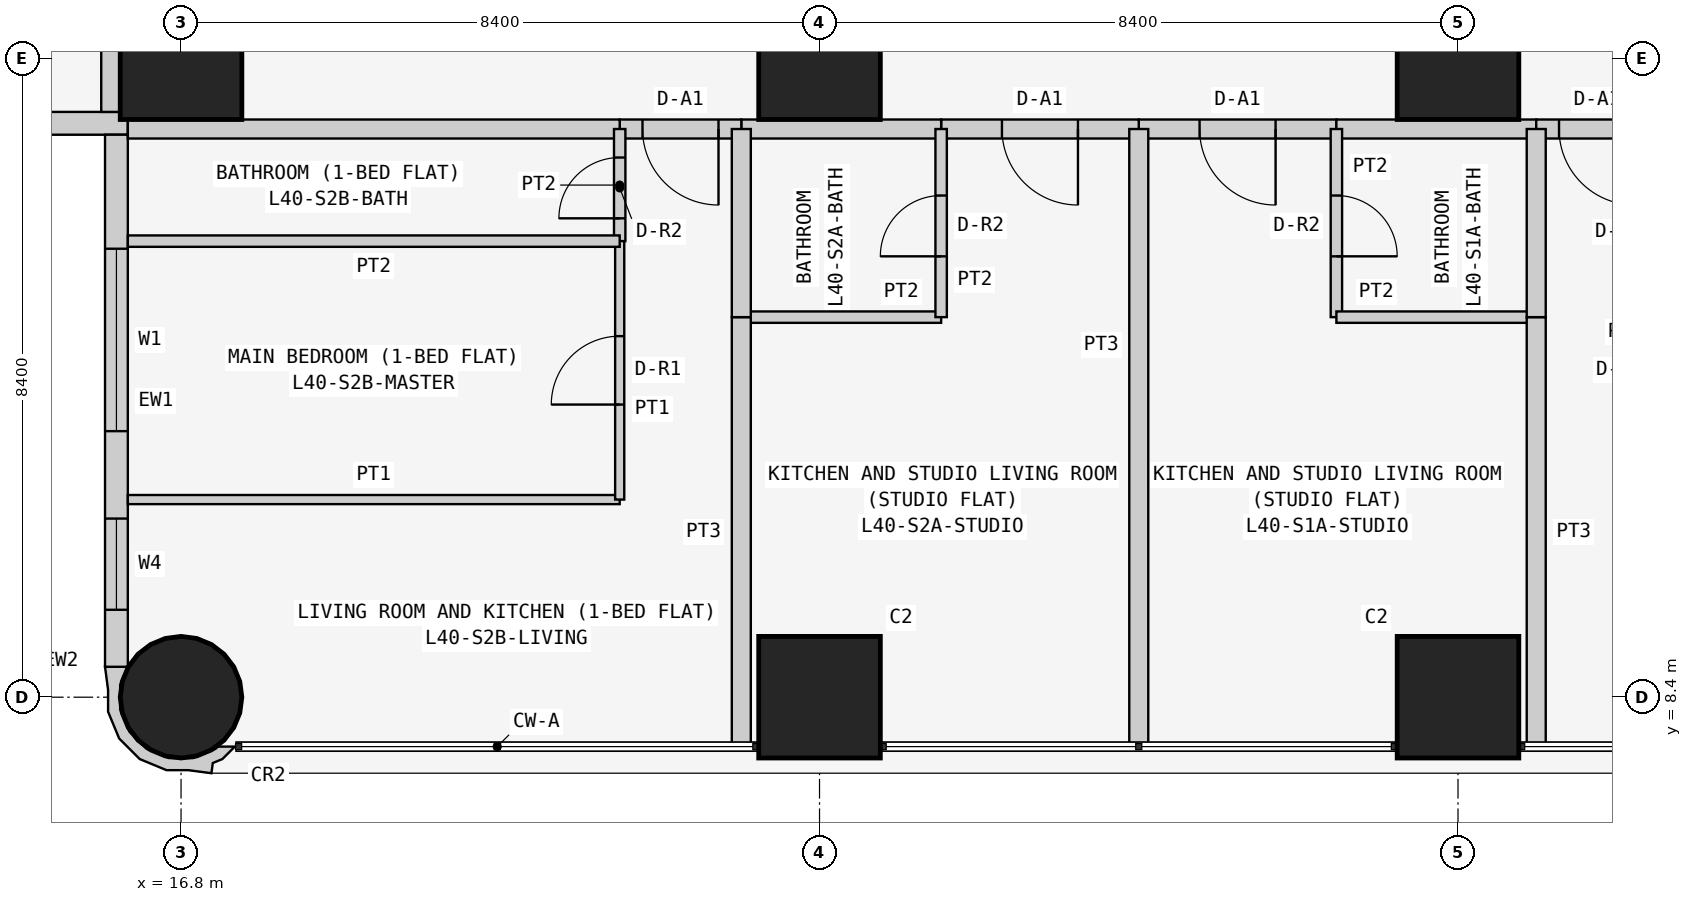
"""IFC4 building model, lengths in metres.
Left out: names, types, materials, properties, quantities, classifications, styles, units other than length and angle.
Written with IfcOpenShell. Run it as: python <this file> out.ifc"""

import sys

from ifc_helpers import new_model, si_unit, direction, frame, frame_2d, origin, origin_2d, place, context, subcontext, project, spatial, polyline, rectangle, circle, outline, extrude, element, fill, save


model = new_model("IFC4")
c1 = context("Model", 3, precision=1e-05, world=origin(), true_north=direction((0.0, 1.0)))
c2 = subcontext(c1, "Body", "Model", "MODEL_VIEW")
j1 = project(units=[si_unit("LENGTHUNIT", "METRE"), si_unit("PLANEANGLEUNIT", "RADIAN")], contexts=[c1])
p1 = place(None, origin())
s1 = spatial("IfcSite", under=j1, at=p1, CompositionType="ELEMENT")
p2 = place(p1, origin())
s2 = spatial("IfcBuilding", under=s1, at=p2, CompositionType="ELEMENT")
p3 = place(p2, frame((0.0, 0.0, 155.7)))
s3 = spatial("IfcBuildingStorey", under=s2, at=p3, CompositionType="ELEMENT", Elevation=155.7)
p4 = place(p3, frame((16.8, 8.4, 0.0), z_axis=(0.0, 0.0, 1.0), x_axis=(1.0, 0.0, 0.0)))
e1 = element("IfcColumn", 1, at=p4, inside=s3, PredefinedType="COLUMN", context=c2, shape_type="SweptSolid", body=[
    extrude(circle(Radius=0.8, at=origin_2d()), origin(), (0.0, 0.0, 1.0), 3.6),
])
for number, where, z_axis, x_axis in (
    (2, (16.8, 16.8, 0.0), (0.0, 0.0, 1.0), (1.0, 0.0, 0.0)),
    (3, (25.2, 8.4, 0.0), (0.0, 0.0, 1.0), (1.0, 0.0, 0.0)),
    (4, (25.2, 16.8, 0.0), (0.0, 0.0, 1.0), (1.0, 0.0, 0.0)),
    (5, (33.6, 8.4, 0.0), (0.0, 0.0, 1.0), (1.0, 0.0, 0.0)),
    (6, (33.6, 16.8, 0.0), (0.0, 0.0, 1.0), (1.0, 0.0, 0.0)),
):
    element("IfcColumn", number, at=place(p3, frame(where, z_axis=z_axis, x_axis=x_axis)), inside=s3, PredefinedType="COLUMN", context=c2, shape_type="SweptSolid", body=[
        extrude(rectangle(XDim=1.6, YDim=1.6, at=origin_2d()), origin(), (0.0, 0.0, 1.0), 3.6),
    ])
p5 = place(p3, frame((0.4, 15.95, 0.0), z_axis=(0.0, 0.0, 1.0), x_axis=(1.0, 0.0, 0.0)))
e7 = element("IfcWall", 7, at=p5, inside=s3, PredefinedType="SOLIDWALL", context=c2, shape_type="SweptSolid", body=[
    extrude(rectangle(XDim=15.7, YDim=0.3, at=frame_2d((7.85, 0.0))), origin(), (0.0, 0.0, 1.0), 3.45),
])
p6 = place(p5, frame((12.4, 0.0, 0.9)))
e8 = element("IfcOpeningElement", 8, at=p6, cuts=e7, PredefinedType="OPENING", context=c2, shape_type="SweptSolid", body=[
    extrude(rectangle(XDim=1.8, YDim=1.5, at=frame_2d((0.9, 0.75))), frame((0.0, 0.16, 0.0), z_axis=(0.0, -1.0, 0.0), x_axis=(1.0, 0.0, 0.0)), (0.0, 0.0, 1.0), 0.32),
])
p7 = place(p5, frame((9.55, 0.0, 1.5)))
e9 = element("IfcOpeningElement", 9, at=p7, cuts=e7, PredefinedType="OPENING", context=c2, shape_type="SweptSolid", body=[
    extrude(rectangle(XDim=0.9, YDim=0.7, at=frame_2d((0.45, 0.35))), frame((0.0, 0.16, 0.0), z_axis=(0.0, -1.0, 0.0), x_axis=(1.0, 0.0, 0.0)), (0.0, 0.0, 1.0), 0.32),
])
p8 = place(p5, frame((5.1, 0.0, 0.9)))
e10 = element("IfcOpeningElement", 10, at=p8, cuts=e7, PredefinedType="OPENING", context=c2, shape_type="SweptSolid", body=[
    extrude(rectangle(XDim=1.8, YDim=1.5, at=frame_2d((0.9, 0.75))), frame((0.0, 0.16, 0.0), z_axis=(0.0, -1.0, 0.0), x_axis=(1.0, 0.0, 0.0)), (0.0, 0.0, 1.0), 0.32),
])
p9 = place(p5, frame((2.0, 0.0, 0.0)))
e11 = element("IfcOpeningElement", 11, at=p9, cuts=e7, PredefinedType="OPENING", context=c2, shape_type="SweptSolid", body=[
    extrude(rectangle(XDim=0.9, YDim=2.4, at=frame_2d((0.45, 1.2))), frame((0.0, 0.16, 0.0), z_axis=(0.0, -1.0, 0.0), x_axis=(1.0, 0.0, 0.0)), (0.0, 0.0, 1.0), 0.32),
])
p10 = place(p5, frame((0.7, 0.0, 0.9)))
e12 = element("IfcOpeningElement", 12, at=p10, cuts=e7, PredefinedType="OPENING", context=c2, shape_type="SweptSolid", body=[
    extrude(rectangle(XDim=1.2, YDim=1.5, at=frame_2d((0.6, 0.75))), frame((0.0, 0.16, 0.0), z_axis=(0.0, -1.0, 0.0), x_axis=(1.0, 0.0, 0.0)), (0.0, 0.0, 1.0), 0.32),
])
p11 = place(p3, frame((15.95, 15.8, 0.0), z_axis=(0.0, 0.0, 1.0), x_axis=(0.0, -1.0, 0.0)))
e13 = element("IfcWall", 13, at=p11, inside=s3, PredefinedType="SOLIDWALL", context=c2, shape_type="SweptSolid", body=[
    extrude(rectangle(XDim=7.0, YDim=0.3, at=frame_2d((3.5, 0.0))), origin(), (0.0, 0.0, 1.0), 3.45),
])
p12 = place(p11, frame((1.5, 0.0, 0.9)))
e14 = element("IfcOpeningElement", 14, at=p12, cuts=e13, PredefinedType="OPENING", context=c2, shape_type="SweptSolid", body=[
    extrude(rectangle(XDim=2.4, YDim=1.5, at=frame_2d((1.2, 0.75))), frame((0.0, 0.16, 0.0), z_axis=(0.0, -1.0, 0.0), x_axis=(1.0, 0.0, 0.0)), (0.0, 0.0, 1.0), 0.32),
])
p13 = place(p11, frame((5.05, 0.0, 0.9)))
e15 = element("IfcOpeningElement", 15, at=p13, cuts=e13, PredefinedType="OPENING", context=c2, shape_type="SweptSolid", body=[
    extrude(rectangle(XDim=1.2, YDim=1.5, at=frame_2d((0.6, 0.75))), frame((0.0, 0.16, 0.0), z_axis=(0.0, -1.0, 0.0), x_axis=(1.0, 0.0, 0.0)), (0.0, 0.0, 1.0), 0.32),
])
p14 = place(p3, frame((15.983, 8.727, 0.0), z_axis=(0.0, 0.0, 1.0), x_axis=(-0.343276641956, -0.93923434088, 0.0)))
e16 = element("IfcWall", 16, at=p14, inside=s3, PredefinedType="SOLIDWALL", context=c2, shape_type="SweptSolid", body=[
    extrude(outline(polyline([(0.829, 1.599), (0.697, 1.569), (0.604, 1.67), (0.394, 1.767), (0.471, 1.556), (0.509, 1.539), (0.724, 1.304), (0.833, 1.005), (0.82, 0.686), (0.686, 0.397), (0.451, 0.182), (0.152, 0.073), (-0.116, 0.084), (-0.127, 0.078), (-0.146, 0.071), (-0.006, -0.197), (0.266, -0.055), (0.535, 0.044), (0.817, 0.302), (0.978, 0.648), (0.994, 1.03), (0.895, 1.3), (0.829, 1.599)])), origin(), (0.0, 0.0, 1.0), 3.45),
])
p15 = place(p3, frame((32.0, 15.875, 0.0), z_axis=(0.0, 0.0, 1.0), x_axis=(-1.0, 0.0, 0.0)))
e17 = element("IfcWall", 17, at=p15, inside=s3, PredefinedType="PARTITIONING", context=c2, shape_type="SweptSolid", body=[
    extrude(rectangle(XDim=2.6, YDim=0.25, at=frame_2d((1.3, 0.0))), origin(), (0.0, 0.0, 1.0), 3.45),
])
p16 = place(p15, frame((0.8, 0.0, 0.0)))
e18 = element("IfcOpeningElement", 18, at=p16, cuts=e17, PredefinedType="OPENING", context=c2, shape_type="SweptSolid", body=[
    extrude(rectangle(XDim=1.0, YDim=2.1, at=frame_2d((0.5, 1.05))), frame((0.0, 0.135, 0.0), z_axis=(0.0, -1.0, 0.0), x_axis=(1.0, 0.0, 0.0)), (0.0, 0.0, 1.0), 0.27),
])
p17 = place(p3, frame((34.629, 15.875, 0.0), z_axis=(0.0, 0.0, 1.0), x_axis=(-1.0, 0.0, 0.0)))
e19 = element("IfcWall", 19, at=p17, inside=s3, PredefinedType="PARTITIONING", context=c2, shape_type="SweptSolid", body=[
    extrude(rectangle(XDim=2.629, YDim=0.25, at=frame_2d((1.314, 0.0))), origin(), (0.0, 0.0, 1.0), 3.45),
])
p18 = place(p3, frame((36.229, 15.875, 0.0), z_axis=(0.0, 0.0, 1.0), x_axis=(-1.0, 0.0, 0.0)))
e20 = element("IfcWall", 20, at=p18, inside=s3, PredefinedType="PARTITIONING", context=c2, shape_type="SweptSolid", body=[
    extrude(rectangle(XDim=1.6, YDim=0.25, at=frame_2d((0.8, 0.0))), origin(), (0.0, 0.0, 1.0), 3.45),
])
p19 = place(p18, frame((0.3, 0.0, 0.0)))
e21 = element("IfcOpeningElement", 21, at=p19, cuts=e20, PredefinedType="OPENING", context=c2, shape_type="SweptSolid", body=[
    extrude(rectangle(XDim=1.0, YDim=2.1, at=frame_2d((0.5, 1.05))), frame((0.0, 0.135, 0.0), z_axis=(0.0, -1.0, 0.0), x_axis=(1.0, 0.0, 0.0)), (0.0, 0.0, 1.0), 0.27),
])
p20 = place(p3, frame((29.4, 15.875, 0.0), z_axis=(0.0, 0.0, 1.0), x_axis=(-1.0, 0.0, 0.0)))
e22 = element("IfcWall", 22, at=p20, inside=s3, PredefinedType="PARTITIONING", context=c2, shape_type="SweptSolid", body=[
    extrude(rectangle(XDim=2.6, YDim=0.25, at=frame_2d((1.3, 0.0))), origin(), (0.0, 0.0, 1.0), 3.45),
])
p21 = place(p20, frame((0.8, 0.0, 0.0)))
e23 = element("IfcOpeningElement", 23, at=p21, cuts=e22, PredefinedType="OPENING", context=c2, shape_type="SweptSolid", body=[
    extrude(rectangle(XDim=1.0, YDim=2.1, at=frame_2d((0.5, 1.05))), frame((0.0, 0.135, 0.0), z_axis=(0.0, -1.0, 0.0), x_axis=(1.0, 0.0, 0.0)), (0.0, 0.0, 1.0), 0.27),
])
p22 = place(p3, frame((26.8, 15.875, 0.0), z_axis=(0.0, 0.0, 1.0), x_axis=(-1.0, 0.0, 0.0)))
e24 = element("IfcWall", 24, at=p22, inside=s3, PredefinedType="PARTITIONING", context=c2, shape_type="SweptSolid", body=[
    extrude(rectangle(XDim=2.629, YDim=0.25, at=frame_2d((1.314, 0.0))), origin(), (0.0, 0.0, 1.0), 3.45),
])
p23 = place(p3, frame((24.171, 15.875, 0.0), z_axis=(0.0, 0.0, 1.0), x_axis=(-1.0, 0.0, 0.0)))
e25 = element("IfcWall", 25, at=p23, inside=s3, PredefinedType="PARTITIONING", context=c2, shape_type="SweptSolid", body=[
    extrude(rectangle(XDim=1.6, YDim=0.25, at=frame_2d((0.8, 0.0))), origin(), (0.0, 0.0, 1.0), 3.45),
])
p24 = place(p23, frame((0.3, 0.0, 0.0)))
e26 = element("IfcOpeningElement", 26, at=p24, cuts=e25, PredefinedType="OPENING", context=c2, shape_type="SweptSolid", body=[
    extrude(rectangle(XDim=1.0, YDim=2.1, at=frame_2d((0.5, 1.05))), frame((0.0, 0.135, 0.0), z_axis=(0.0, -1.0, 0.0), x_axis=(1.0, 0.0, 0.0)), (0.0, 0.0, 1.0), 0.27),
])
p25 = place(p3, frame((22.571, 15.875, 0.0), z_axis=(0.0, 0.0, 1.0), x_axis=(-1.0, 0.0, 0.0)))
e27 = element("IfcWall", 27, at=p25, inside=s3, PredefinedType="PARTITIONING", context=c2, shape_type="SweptSolid", body=[
    extrude(rectangle(XDim=6.471, YDim=0.25, at=frame_2d((3.235, 0.0))), origin(), (0.0, 0.0, 1.0), 3.45),
])
p26 = place(p3, frame((15.875, 16.1, 0.0), z_axis=(0.0, 0.0, 1.0), x_axis=(0.0, 1.0, 0.0)))
e28 = element("IfcWall", 28, at=p26, inside=s3, PredefinedType="PARTITIONING", context=c2, shape_type="SweptSolid", body=[
    extrude(rectangle(XDim=6.871, YDim=0.25, at=frame_2d((3.436, 0.0))), origin(), (0.0, 0.0, 1.0), 3.45),
])
p27 = place(p3, frame((32.0, 15.875, 0.0), z_axis=(0.0, 0.0, 1.0), x_axis=(0.0, -1.0, 0.0)))
e29 = element("IfcWall", 29, at=p27, inside=s3, PredefinedType="PARTITIONING", context=c2, shape_type="SweptSolid", body=[
    extrude(rectangle(XDim=2.475, YDim=0.15, at=frame_2d((1.238, 0.0))), origin(), (0.0, 0.0, 1.0), 3.45),
])
p28 = place(p27, frame((0.875, 0.0, 0.0)))
e30 = element("IfcOpeningElement", 30, at=p28, cuts=e29, PredefinedType="OPENING", context=c2, shape_type="SweptSolid", body=[
    extrude(rectangle(XDim=0.8, YDim=2.1, at=frame_2d((0.4, 1.05))), frame((0.0, 0.085, 0.0), z_axis=(0.0, -1.0, 0.0), x_axis=(1.0, 0.0, 0.0)), (0.0, 0.0, 1.0), 0.17),
])
p29 = place(p3, frame((32.0, 13.4, 0.0), z_axis=(0.0, 0.0, 1.0), x_axis=(1.0, 0.0, 0.0)))
e31 = element("IfcWall", 31, at=p29, inside=s3, PredefinedType="PARTITIONING", context=c2, shape_type="SweptSolid", body=[
    extrude(rectangle(XDim=2.629, YDim=0.15, at=frame_2d((1.314, 0.0))), origin(), (0.0, 0.0, 1.0), 3.45),
])
p30 = place(p3, frame((34.629, 13.4, 0.0), z_axis=(0.0, 0.0, 1.0), x_axis=(0.0, -1.0, 0.0)))
e32 = element("IfcWall", 32, at=p30, inside=s3, PredefinedType="PARTITIONING", context=c2, shape_type="SweptSolid", body=[
    extrude(rectangle(XDim=5.65, YDim=0.25, at=frame_2d((2.825, 0.0))), origin(), (0.0, 0.0, 1.0), 3.45),
])
p31 = place(p3, frame((29.4, 7.75, 0.0), z_axis=(0.0, 0.0, 1.0), x_axis=(0.0, 1.0, 0.0)))
e33 = element("IfcWall", 33, at=p31, inside=s3, PredefinedType="PARTITIONING", context=c2, shape_type="SweptSolid", body=[
    extrude(rectangle(XDim=8.125, YDim=0.25, at=frame_2d((4.062, 0.0))), origin(), (0.0, 0.0, 1.0), 2.848),
])
p32 = place(p3, frame((34.629, 13.4, 0.0), z_axis=(0.0, 0.0, 1.0), x_axis=(0.0, 1.0, 0.0)))
e34 = element("IfcWall", 34, at=p32, inside=s3, PredefinedType="PARTITIONING", context=c2, shape_type="SweptSolid", body=[
    extrude(rectangle(XDim=2.475, YDim=0.25, at=frame_2d((1.238, 0.0))), origin(), (0.0, 0.0, 1.0), 3.45),
])
p33 = place(p3, frame((24.171, 13.4, 0.0), z_axis=(0.0, 0.0, 1.0), x_axis=(1.0, 0.0, 0.0)))
e35 = element("IfcWall", 35, at=p33, inside=s3, PredefinedType="PARTITIONING", context=c2, shape_type="SweptSolid", body=[
    extrude(rectangle(XDim=2.629, YDim=0.15, at=frame_2d((1.314, 0.0))), origin(), (0.0, 0.0, 1.0), 3.45),
])
p34 = place(p3, frame((26.8, 13.4, 0.0), z_axis=(0.0, 0.0, 1.0), x_axis=(0.0, 1.0, 0.0)))
e36 = element("IfcWall", 36, at=p34, inside=s3, PredefinedType="PARTITIONING", context=c2, shape_type="SweptSolid", body=[
    extrude(rectangle(XDim=2.475, YDim=0.15, at=frame_2d((1.238, 0.0))), origin(), (0.0, 0.0, 1.0), 3.45),
])
p35 = place(p34, frame((0.8, 0.0, 0.0)))
e37 = element("IfcOpeningElement", 37, at=p35, cuts=e36, PredefinedType="OPENING", context=c2, shape_type="SweptSolid", body=[
    extrude(rectangle(XDim=0.8, YDim=2.1, at=frame_2d((0.4, 1.05))), frame((0.0, 0.085, 0.0), z_axis=(0.0, -1.0, 0.0), x_axis=(1.0, 0.0, 0.0)), (0.0, 0.0, 1.0), 0.17),
])
p36 = place(p3, frame((24.171, 7.75, 0.0), z_axis=(0.0, 0.0, 1.0), x_axis=(0.0, 1.0, 0.0)))
e38 = element("IfcWall", 38, at=p36, inside=s3, PredefinedType="PARTITIONING", context=c2, shape_type="SweptSolid", body=[
    extrude(rectangle(XDim=5.65, YDim=0.25, at=frame_2d((2.825, 0.0))), origin(), (0.0, 0.0, 1.0), 3.45),
])
p37 = place(p3, frame((24.171, 13.4, 0.0), z_axis=(0.0, 0.0, 1.0), x_axis=(0.0, 1.0, 0.0)))
e39 = element("IfcWall", 39, at=p37, inside=s3, PredefinedType="PARTITIONING", context=c2, shape_type="SweptSolid", body=[
    extrude(rectangle(XDim=2.475, YDim=0.25, at=frame_2d((1.238, 0.0))), origin(), (0.0, 0.0, 1.0), 3.45),
])
p38 = place(p3, frame((22.571, 14.4, 0.0), z_axis=(0.0, 0.0, 1.0), x_axis=(0.0, 1.0, 0.0)))
e40 = element("IfcWall", 40, at=p38, inside=s3, PredefinedType="PARTITIONING", context=c2, shape_type="SweptSolid", body=[
    extrude(rectangle(XDim=1.475, YDim=0.15, at=frame_2d((0.738, 0.0))), origin(), (0.0, 0.0, 1.0), 3.45),
])
p39 = place(p38, frame((0.3, 0.0, 0.0)))
e41 = element("IfcOpeningElement", 41, at=p39, cuts=e40, PredefinedType="OPENING", context=c2, shape_type="SweptSolid", body=[
    extrude(rectangle(XDim=0.8, YDim=2.1, at=frame_2d((0.4, 1.05))), frame((0.0, 0.085, 0.0), z_axis=(0.0, -1.0, 0.0), x_axis=(1.0, 0.0, 0.0)), (0.0, 0.0, 1.0), 0.17),
])
p40 = place(p3, frame((16.1, 11.0, 0.0), z_axis=(0.0, 0.0, 1.0), x_axis=(1.0, 0.0, 0.0)))
e42 = element("IfcWall", 42, at=p40, inside=s3, PredefinedType="PARTITIONING", context=c2, shape_type="SweptSolid", body=[
    extrude(rectangle(XDim=6.471, YDim=0.12, at=frame_2d((3.235, 0.0))), origin(), (0.0, 0.0, 1.0), 3.45),
])
p41 = place(p3, frame((22.571, 11.0, 0.0), z_axis=(0.0, 0.0, 1.0), x_axis=(0.0, 1.0, 0.0)))
e43 = element("IfcWall", 43, at=p41, inside=s3, PredefinedType="PARTITIONING", context=c2, shape_type="SweptSolid", body=[
    extrude(rectangle(XDim=3.4, YDim=0.12, at=frame_2d((1.7, 0.0))), origin(), (0.0, 0.0, 1.0), 3.45),
])
p42 = place(p41, frame((1.25, 0.0, 0.0)))
e44 = element("IfcOpeningElement", 44, at=p42, cuts=e43, PredefinedType="OPENING", context=c2, shape_type="SweptSolid", body=[
    extrude(rectangle(XDim=0.9, YDim=2.1, at=frame_2d((0.45, 1.05))), frame((0.0, 0.07, 0.0), z_axis=(0.0, -1.0, 0.0), x_axis=(1.0, 0.0, 0.0)), (0.0, 0.0, 1.0), 0.14),
])
p43 = place(p3, frame((22.571, 14.4, 0.0), z_axis=(0.0, 0.0, 1.0), x_axis=(-1.0, 0.0, 0.0)))
e45 = element("IfcWall", 45, at=p43, inside=s3, PredefinedType="PARTITIONING", context=c2, shape_type="SweptSolid", body=[
    extrude(rectangle(XDim=6.471, YDim=0.15, at=frame_2d((3.235, 0.0))), origin(), (0.0, 0.0, 1.0), 3.45),
])
p44 = place(p12, origin())
e46 = element("IfcWindow", 46, at=p44, inside=s3, PartitioningType="SINGLE_PANEL", PredefinedType="WINDOW", context=c2, shape_type="SweptSolid", body=[
    extrude(rectangle(XDim=2.4, YDim=1.5, at=frame_2d((1.2, 0.75))), frame((0.0, 0.03, 0.0), z_axis=(0.0, -1.0, 0.0), x_axis=(1.0, 0.0, 0.0)), (0.0, 0.0, 1.0), 0.06),
])
fill(e14, e46)
p45 = place(p13, origin())
e47 = element("IfcWindow", 47, at=p45, inside=s3, PartitioningType="SINGLE_PANEL", PredefinedType="WINDOW", context=c2, shape_type="SweptSolid", body=[
    extrude(rectangle(XDim=1.2, YDim=1.5, at=frame_2d((0.6, 0.75))), frame((0.0, 0.03, 0.0), z_axis=(0.0, -1.0, 0.0), x_axis=(1.0, 0.0, 0.0)), (0.0, 0.0, 1.0), 0.06),
])
fill(e15, e47)
p46 = place(p16, origin())
e48 = element("IfcDoor", 48, at=p46, inside=s3, OperationType="SINGLE_SWING_LEFT", PredefinedType="DOOR", context=c2, shape_type="SweptSolid", body=[
    extrude(rectangle(XDim=1.0, YDim=2.1, at=frame_2d((0.5, 1.05))), frame((0.0, 0.025, 0.0), z_axis=(0.0, -1.0, 0.0), x_axis=(1.0, 0.0, 0.0)), (0.0, 0.0, 1.0), 0.05),
])
fill(e18, e48)
p47 = place(p28, origin())
e49 = element("IfcDoor", 49, at=p47, inside=s3, OperationType="SINGLE_SWING_RIGHT", PredefinedType="DOOR", context=c2, shape_type="SweptSolid", body=[
    extrude(rectangle(XDim=0.8, YDim=2.1, at=frame_2d((0.4, 1.05))), frame((0.0, 0.025, 0.0), z_axis=(0.0, -1.0, 0.0), x_axis=(1.0, 0.0, 0.0)), (0.0, 0.0, 1.0), 0.05),
])
fill(e30, e49)
p48 = place(p19, origin())
e50 = element("IfcDoor", 50, at=p48, inside=s3, OperationType="SINGLE_SWING_LEFT", PredefinedType="DOOR", context=c2, shape_type="SweptSolid", body=[
    extrude(rectangle(XDim=1.0, YDim=2.1, at=frame_2d((0.5, 1.05))), frame((0.0, 0.025, 0.0), z_axis=(0.0, -1.0, 0.0), x_axis=(1.0, 0.0, 0.0)), (0.0, 0.0, 1.0), 0.05),
])
fill(e21, e50)
p49 = place(p21, origin())
e51 = element("IfcDoor", 51, at=p49, inside=s3, OperationType="SINGLE_SWING_LEFT", PredefinedType="DOOR", context=c2, shape_type="SweptSolid", body=[
    extrude(rectangle(XDim=1.0, YDim=2.1, at=frame_2d((0.5, 1.05))), frame((0.0, 0.025, 0.0), z_axis=(0.0, -1.0, 0.0), x_axis=(1.0, 0.0, 0.0)), (0.0, 0.0, 1.0), 0.05),
])
fill(e23, e51)
p50 = place(p35, origin())
e52 = element("IfcDoor", 52, at=p50, inside=s3, OperationType="SINGLE_SWING_LEFT", PredefinedType="DOOR", context=c2, shape_type="SweptSolid", body=[
    extrude(rectangle(XDim=0.8, YDim=2.1, at=frame_2d((0.4, 1.05))), frame((0.0, 0.025, 0.0), z_axis=(0.0, -1.0, 0.0), x_axis=(1.0, 0.0, 0.0)), (0.0, 0.0, 1.0), 0.05),
])
fill(e37, e52)
p51 = place(p24, origin())
e53 = element("IfcDoor", 53, at=p51, inside=s3, OperationType="SINGLE_SWING_LEFT", PredefinedType="DOOR", context=c2, shape_type="SweptSolid", body=[
    extrude(rectangle(XDim=1.0, YDim=2.1, at=frame_2d((0.5, 1.05))), frame((0.0, 0.025, 0.0), z_axis=(0.0, -1.0, 0.0), x_axis=(1.0, 0.0, 0.0)), (0.0, 0.0, 1.0), 0.05),
])
fill(e26, e53)
p52 = place(p39, origin())
e54 = element("IfcDoor", 54, at=p52, inside=s3, OperationType="SINGLE_SWING_LEFT", PredefinedType="DOOR", context=c2, shape_type="SweptSolid", body=[
    extrude(rectangle(XDim=0.8, YDim=2.1, at=frame_2d((0.4, 1.05))), frame((0.0, 0.025, 0.0), z_axis=(0.0, -1.0, 0.0), x_axis=(1.0, 0.0, 0.0)), (0.0, 0.0, 1.0), 0.05),
])
fill(e41, e54)
p53 = place(p42, origin())
e55 = element("IfcDoor", 55, at=p53, inside=s3, OperationType="SINGLE_SWING_LEFT", PredefinedType="DOOR", context=c2, shape_type="SweptSolid", body=[
    extrude(rectangle(XDim=0.9, YDim=2.1, at=frame_2d((0.45, 1.05))), frame((0.0, 0.025, 0.0), z_axis=(0.0, -1.0, 0.0), x_axis=(1.0, 0.0, 0.0)), (0.0, 0.0, 1.0), 0.05),
])
fill(e44, e55)
save(model, sys.argv[1])
